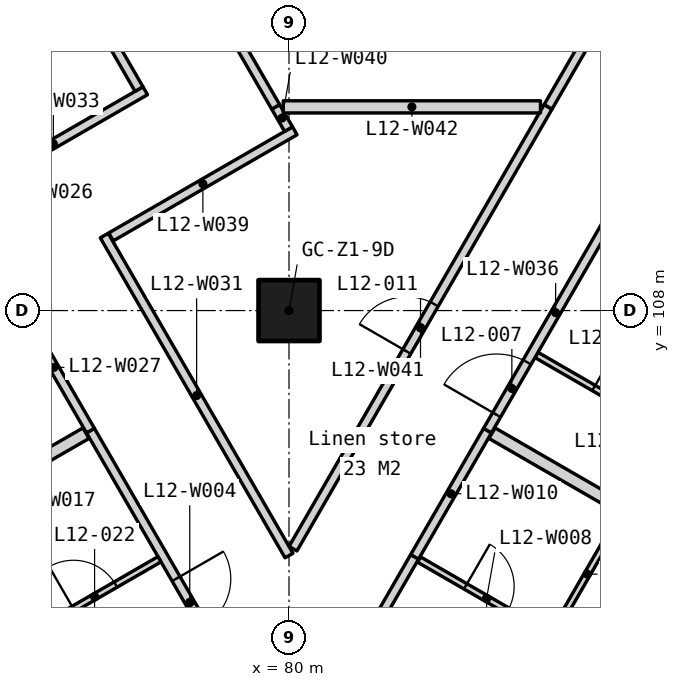
"""IFC4 building model, lengths in metres.
Left out: names, types, materials, properties, quantities, classifications, styles, units other than length and angle.
Written with IfcOpenShell. Run it as: python <this file> out.ifc"""

import sys

from ifc_helpers import new_model, si_unit, direction, frame, frame_2d, origin, origin_2d, place, context, subcontext, project, spatial, polyline, rectangle, outline, extrude, element, fill, save


model = new_model("IFC4")
c1 = context("Model", 3, precision=1e-05, world=origin(), true_north=direction((0.0, 1.0)))
c2 = subcontext(c1, "Body", "Model", "MODEL_VIEW")
j1 = project(units=[si_unit("LENGTHUNIT", "METRE"), si_unit("PLANEANGLEUNIT", "RADIAN")], contexts=[c1])
p1 = place(None, origin())
s1 = spatial("IfcSite", under=j1, at=p1, CompositionType="ELEMENT")
p2 = place(p1, origin())
s2 = spatial("IfcBuilding", under=s1, at=p2, CompositionType="ELEMENT")
p3 = place(p2, frame((0.0, 0.0, 56.0)))
s3 = spatial("IfcBuildingStorey", under=s2, at=p3, CompositionType="ELEMENT", Elevation=56.0)
p4 = place(p3, frame((80.0, 108.0, 0.0), z_axis=(0.0, 0.0, 1.0), x_axis=(1.0, 0.0, 0.0)))
e1 = element("IfcColumn", 1, at=p4, inside=s3, PredefinedType="COLUMN", context=c2, shape_type="SweptSolid", body=[
    extrude(rectangle(XDim=1.0, YDim=1.0, at=origin_2d()), origin(), (0.0, 0.0, 1.0), 3.5),
])
p5 = place(p3, frame((64.305, 112.405, -0.15), z_axis=(0.0, 0.0, 1.0), x_axis=(0.499997464327, -0.866026867751, 0.0)))
e2 = element("IfcWall", 2, at=p5, inside=s3, PredefinedType="SOLIDWALL", context=c2, shape_type="SweptSolid", body=[
    extrude(outline(polyline([(25.18, 3.5), (25.18, 0.0), (0.0, 0.0), (0.0, 3.5), (25.18, 3.5)])), frame((0.0, 0.225, 0.0), z_axis=(0.0, -1.0, 0.0), x_axis=(1.0, 0.0, 0.0)), (0.0, 0.0, 1.0), 0.45),
])
p6 = place(p5, frame((5.21, 0.0, 1.05)))
e3 = element("IfcOpeningElement", 3, at=p6, cuts=e2, PredefinedType="OPENING", context=c2, shape_type="SweptSolid", body=[
    extrude(rectangle(XDim=1.8, YDim=1.5, at=frame_2d((0.9, 0.75))), frame((0.0, 0.235, 0.0), z_axis=(0.0, -1.0, 0.0), x_axis=(1.0, 0.0, 0.0)), (0.0, 0.0, 1.0), 0.47),
])
p7 = place(p5, frame((7.51, 0.0, 1.05)))
e4 = element("IfcOpeningElement", 4, at=p7, cuts=e2, PredefinedType="OPENING", context=c2, shape_type="SweptSolid", body=[
    extrude(rectangle(XDim=1.8, YDim=1.5, at=frame_2d((0.9, 0.75))), frame((0.0, 0.235, 0.0), z_axis=(0.0, -1.0, 0.0), x_axis=(1.0, 0.0, 0.0)), (0.0, 0.0, 1.0), 0.47),
])
p8 = place(p5, frame((14.17, 0.0, 1.05)))
e5 = element("IfcOpeningElement", 5, at=p8, cuts=e2, PredefinedType="OPENING", context=c2, shape_type="SweptSolid", body=[
    extrude(rectangle(XDim=1.8, YDim=1.5, at=frame_2d((0.9, 0.75))), frame((0.0, 0.235, 0.0), z_axis=(0.0, -1.0, 0.0), x_axis=(1.0, 0.0, 0.0)), (0.0, 0.0, 1.0), 0.47),
])
p9 = place(p5, frame((16.47, 0.0, 1.05)))
e6 = element("IfcOpeningElement", 6, at=p9, cuts=e2, PredefinedType="OPENING", context=c2, shape_type="SweptSolid", body=[
    extrude(rectangle(XDim=1.8, YDim=1.5, at=frame_2d((0.9, 0.75))), frame((0.0, 0.235, 0.0), z_axis=(0.0, -1.0, 0.0), x_axis=(1.0, 0.0, 0.0)), (0.0, 0.0, 1.0), 0.47),
])
p10 = place(p5, frame((23.194, 0.0, 1.05)))
e7 = element("IfcOpeningElement", 7, at=p10, cuts=e2, PredefinedType="OPENING", context=c2, shape_type="SweptSolid", body=[
    extrude(rectangle(XDim=1.2, YDim=1.5, at=frame_2d((0.6, 0.75))), frame((0.0, 0.235, 0.0), z_axis=(0.0, -1.0, 0.0), x_axis=(1.0, 0.0, 0.0)), (0.0, 0.0, 1.0), 0.47),
])
p11 = place(p3, frame((83.105, 90.599, -0.15), z_axis=(0.0, 0.0, 1.0), x_axis=(0.499999201451, 0.866025864826, 0.0)))
e8 = element("IfcWall", 8, at=p11, inside=s3, PredefinedType="SOLIDWALL", context=c2, shape_type="SweptSolid", body=[
    extrude(outline(polyline([(44.8, 0.0), (44.8, 3.5), (0.0, 3.5), (0.0, 0.0), (44.8, 0.0)])), frame((0.0, 0.225, 0.0), z_axis=(0.0, -1.0, 0.0), x_axis=(1.0, 0.0, 0.0)), (0.0, 0.0, 1.0), 0.45),
])
p12 = place(p11, frame((0.786, 0.0, 1.05)))
e9 = element("IfcOpeningElement", 9, at=p12, cuts=e8, PredefinedType="OPENING", context=c2, shape_type="SweptSolid", body=[
    extrude(rectangle(XDim=1.2, YDim=1.5, at=frame_2d((0.6, 0.75))), frame((0.0, 0.235, 0.0), z_axis=(0.0, -1.0, 0.0), x_axis=(1.0, 0.0, 0.0)), (0.0, 0.0, 1.0), 0.47),
])
p13 = place(p11, frame((6.91, 0.0, 1.05)))
e10 = element("IfcOpeningElement", 10, at=p13, cuts=e8, PredefinedType="OPENING", context=c2, shape_type="SweptSolid", body=[
    extrude(rectangle(XDim=1.8, YDim=1.5, at=frame_2d((0.9, 0.75))), frame((0.0, 0.235, 0.0), z_axis=(0.0, -1.0, 0.0), x_axis=(1.0, 0.0, 0.0)), (0.0, 0.0, 1.0), 0.47),
])
p14 = place(p11, frame((9.21, 0.0, 1.05)))
e11 = element("IfcOpeningElement", 11, at=p14, cuts=e8, PredefinedType="OPENING", context=c2, shape_type="SweptSolid", body=[
    extrude(rectangle(XDim=1.8, YDim=1.5, at=frame_2d((0.9, 0.75))), frame((0.0, 0.235, 0.0), z_axis=(0.0, -1.0, 0.0), x_axis=(1.0, 0.0, 0.0)), (0.0, 0.0, 1.0), 0.47),
])
p15 = place(p11, frame((15.87, 0.0, 1.05)))
e12 = element("IfcOpeningElement", 12, at=p15, cuts=e8, PredefinedType="OPENING", context=c2, shape_type="SweptSolid", body=[
    extrude(rectangle(XDim=1.8, YDim=1.5, at=frame_2d((0.9, 0.75))), frame((0.0, 0.235, 0.0), z_axis=(0.0, -1.0, 0.0), x_axis=(1.0, 0.0, 0.0)), (0.0, 0.0, 1.0), 0.47),
])
p16 = place(p11, frame((18.17, 0.0, 1.05)))
e13 = element("IfcOpeningElement", 13, at=p16, cuts=e8, PredefinedType="OPENING", context=c2, shape_type="SweptSolid", body=[
    extrude(rectangle(XDim=1.8, YDim=1.5, at=frame_2d((0.9, 0.75))), frame((0.0, 0.235, 0.0), z_axis=(0.0, -1.0, 0.0), x_axis=(1.0, 0.0, 0.0)), (0.0, 0.0, 1.0), 0.47),
])
p17 = place(p11, frame((24.83, 0.0, 1.05)))
e14 = element("IfcOpeningElement", 14, at=p17, cuts=e8, PredefinedType="OPENING", context=c2, shape_type="SweptSolid", body=[
    extrude(rectangle(XDim=1.8, YDim=1.5, at=frame_2d((0.9, 0.75))), frame((0.0, 0.235, 0.0), z_axis=(0.0, -1.0, 0.0), x_axis=(1.0, 0.0, 0.0)), (0.0, 0.0, 1.0), 0.47),
])
p18 = place(p11, frame((27.13, 0.0, 1.05)))
e15 = element("IfcOpeningElement", 15, at=p18, cuts=e8, PredefinedType="OPENING", context=c2, shape_type="SweptSolid", body=[
    extrude(rectangle(XDim=1.8, YDim=1.5, at=frame_2d((0.9, 0.75))), frame((0.0, 0.235, 0.0), z_axis=(0.0, -1.0, 0.0), x_axis=(1.0, 0.0, 0.0)), (0.0, 0.0, 1.0), 0.47),
])
p19 = place(p11, frame((33.79, 0.0, 1.05)))
e16 = element("IfcOpeningElement", 16, at=p19, cuts=e8, PredefinedType="OPENING", context=c2, shape_type="SweptSolid", body=[
    extrude(rectangle(XDim=1.8, YDim=1.5, at=frame_2d((0.9, 0.75))), frame((0.0, 0.235, 0.0), z_axis=(0.0, -1.0, 0.0), x_axis=(1.0, 0.0, 0.0)), (0.0, 0.0, 1.0), 0.47),
])
p20 = place(p11, frame((36.09, 0.0, 1.05)))
e17 = element("IfcOpeningElement", 17, at=p20, cuts=e8, PredefinedType="OPENING", context=c2, shape_type="SweptSolid", body=[
    extrude(rectangle(XDim=1.8, YDim=1.5, at=frame_2d((0.9, 0.75))), frame((0.0, 0.235, 0.0), z_axis=(0.0, -1.0, 0.0), x_axis=(1.0, 0.0, 0.0)), (0.0, 0.0, 1.0), 0.47),
])
p21 = place(p11, frame((42.814, 0.0, 1.05)))
e18 = element("IfcOpeningElement", 18, at=p21, cuts=e8, PredefinedType="OPENING", context=c2, shape_type="SweptSolid", body=[
    extrude(rectangle(XDim=1.2, YDim=1.5, at=frame_2d((0.6, 0.75))), frame((0.0, 0.235, 0.0), z_axis=(0.0, -1.0, 0.0), x_axis=(1.0, 0.0, 0.0)), (0.0, 0.0, 1.0), 0.47),
])
p22 = place(p3, frame((76.735, 106.026, 0.0), z_axis=(0.0, 0.0, 1.0), x_axis=(0.499995393218, -0.866028063495, 0.0)))
e19 = element("IfcWall", 19, at=p22, inside=s3, PredefinedType="PARTITIONING", context=c2, shape_type="SweptSolid", body=[
    extrude(rectangle(XDim=6.53, YDim=0.15, at=frame_2d((3.265, 0.0))), origin(), (0.0, 0.0, 1.0), 3.35),
])
p23 = place(p22, frame((2.815, 0.0, 0.0)))
e20 = element("IfcOpeningElement", 20, at=p23, cuts=e19, PredefinedType="OPENING", context=c2, shape_type="SweptSolid", body=[
    extrude(rectangle(XDim=0.9, YDim=2.1, at=frame_2d((0.45, 1.05))), frame((0.0, 0.085, 0.0), z_axis=(0.0, -1.0, 0.0), x_axis=(1.0, 0.0, 0.0)), (0.0, 0.0, 1.0), 0.17),
])
p24 = place(p3, frame((83.339, 105.983, 0.0), z_axis=(0.0, 0.0, 1.0), x_axis=(0.866023858256, -0.500002676924, 0.0)))
e21 = element("IfcWall", 21, at=p24, inside=s3, PredefinedType="PARTITIONING", context=c2, shape_type="SweptSolid", body=[
    extrude(rectangle(XDim=7.265, YDim=0.2, at=frame_2d((3.633, 0.0))), origin(), (0.0, 0.0, 1.0), 3.35),
])
p25 = place(p3, frame((82.139, 103.905, 0.0), z_axis=(0.0, 0.0, 1.0), x_axis=(0.866014388206, -0.500019079056, 0.0)))
e22 = element("IfcWall", 22, at=p25, inside=s3, PredefinedType="PARTITIONING", context=c2, shape_type="SweptSolid", body=[
    extrude(rectangle(XDim=2.565, YDim=0.1, at=frame_2d((1.282, 0.0))), origin(), (0.0, 0.0, 1.0), 3.35),
])
p26 = place(p25, frame((0.883, 0.0, 0.0)))
e23 = element("IfcOpeningElement", 23, at=p26, cuts=e22, PredefinedType="OPENING", context=c2, shape_type="SweptSolid", body=[
    extrude(rectangle(XDim=0.8, YDim=2.1, at=frame_2d((0.4, 1.05))), frame((0.0, 0.06, 0.0), z_axis=(0.0, -1.0, 0.0), x_axis=(1.0, 0.0, 0.0)), (0.0, 0.0, 1.0), 0.12),
])
p27 = place(p3, frame((75.735, 102.677, 0.0), z_axis=(0.0, 0.0, 1.0), x_axis=(0.866040446274, 0.499973944738, 0.0)))
e24 = element("IfcWall", 24, at=p27, inside=s3, PredefinedType="PARTITIONING", context=c2, shape_type="SweptSolid", body=[
    extrude(rectangle(XDim=2.465, YDim=0.1, at=frame_2d((1.232, 0.0))), origin(), (0.0, 0.0, 1.0), 3.35),
])
p28 = place(p27, frame((0.833, 0.0, 0.0)))
e25 = element("IfcOpeningElement", 25, at=p28, cuts=e24, PredefinedType="OPENING", context=c2, shape_type="SweptSolid", body=[
    extrude(rectangle(XDim=0.8, YDim=2.1, at=frame_2d((0.4, 1.05))), frame((0.0, 0.06, 0.0), z_axis=(0.0, -1.0, 0.0), x_axis=(1.0, 0.0, 0.0)), (0.0, 0.0, 1.0), 0.12),
])
p29 = place(p3, frame((82.065, 103.947, 0.0), z_axis=(0.0, 0.0, 1.0), x_axis=(0.500001309137, 0.866024647952, 0.0)))
e26 = element("IfcWall", 26, at=p29, inside=s3, PredefinedType="PARTITIONING", context=c2, shape_type="SweptSolid", body=[
    extrude(rectangle(XDim=2.4, YDim=0.15, at=frame_2d((1.2, 0.0))), origin(), (0.0, 0.0, 1.0), 3.35),
])
p30 = place(p3, frame((80.06, 100.474, 0.0), z_axis=(0.0, 0.0, 1.0), x_axis=(0.499963124258, 0.866046692957, 0.0)))
e27 = element("IfcWall", 27, at=p30, inside=s3, PredefinedType="PARTITIONING", context=c2, shape_type="SweptSolid", body=[
    extrude(rectangle(XDim=4.01, YDim=0.15, at=frame_2d((2.005, 0.0))), origin(), (0.0, 0.0, 1.0), 3.35),
])
p31 = place(p30, frame((1.555, 0.0, 0.0)))
e28 = element("IfcOpeningElement", 28, at=p31, cuts=e27, PredefinedType="OPENING", context=c2, shape_type="SweptSolid", body=[
    extrude(rectangle(XDim=0.9, YDim=2.1, at=frame_2d((0.45, 1.05))), frame((0.0, 0.085, 0.0), z_axis=(0.0, -1.0, 0.0), x_axis=(1.0, 0.0, 0.0)), (0.0, 0.0, 1.0), 0.17),
])
p32 = place(p3, frame((84.342, 102.69, 0.0), z_axis=(0.0, 0.0, 1.0), x_axis=(0.499966648284, 0.866044658551, 0.0)))
e29 = element("IfcWall", 29, at=p32, inside=s3, PredefinedType="PARTITIONING", context=c2, shape_type="SweptSolid", body=[
    extrude(rectangle(XDim=2.25, YDim=0.1, at=frame_2d((1.125, 0.0))), origin(), (0.0, 0.0, 1.0), 3.35),
])
p33 = place(p3, frame((84.07, 107.27, 0.0), z_axis=(0.0, 0.0, 1.0), x_axis=(0.866053027861, -0.499952150643, 0.0)))
e30 = element("IfcWall", 30, at=p33, inside=s3, PredefinedType="PARTITIONING", context=c2, shape_type="SweptSolid", body=[
    extrude(rectangle(XDim=2.975, YDim=0.1, at=frame_2d((1.487, 0.0))), origin(), (0.0, 0.0, 1.0), 3.35),
])
p34 = place(p33, frame((1.087, 0.0, 0.0)))
e31 = element("IfcOpeningElement", 31, at=p34, cuts=e30, PredefinedType="OPENING", context=c2, shape_type="SweptSolid", body=[
    extrude(rectangle(XDim=0.8, YDim=2.1, at=frame_2d((0.4, 1.05))), frame((0.0, 0.06, 0.0), z_axis=(0.0, -1.0, 0.0), x_axis=(1.0, 0.0, 0.0)), (0.0, 0.0, 1.0), 0.12),
])
p35 = place(p3, frame((74.483, 104.726, 0.0), z_axis=(0.0, 0.0, 1.0), x_axis=(0.866006140796, 0.500033362991, 0.0)))
e32 = element("IfcWall", 32, at=p35, inside=s3, PredefinedType="PARTITIONING", context=c2, shape_type="SweptSolid", body=[
    extrude(rectangle(XDim=2.515, YDim=0.2, at=frame_2d((1.257, 0.0))), origin(), (0.0, 0.0, 1.0), 3.35),
])
p36 = place(p3, frame((75.535, 108.104, 0.0), z_axis=(0.0, 0.0, 1.0), x_axis=(0.500033551112, -0.866006032174, 0.0)))
e33 = element("IfcWall", 33, at=p36, inside=s3, PredefinedType="PARTITIONING", context=c2, shape_type="SweptSolid", body=[
    extrude(rectangle(XDim=2.4, YDim=0.15, at=frame_2d((1.2, 0.0))), origin(), (0.0, 0.0, 1.0), 3.35),
])
p37 = place(p3, frame((76.961, 109.234, 0.0), z_axis=(0.0, 0.0, 1.0), x_axis=(0.499984420002, -0.866034398714, 0.0)))
e34 = element("IfcWall", 34, at=p37, inside=s3, PredefinedType="PARTITIONING", context=c2, shape_type="SweptSolid", body=[
    extrude(rectangle(XDim=6.077, YDim=0.15, at=frame_2d((3.039, 0.0))), origin(), (0.0, 0.0, 1.0), 3.35),
])
p38 = place(p3, frame((74.614, 109.87, 0.0), z_axis=(0.0, 0.0, 1.0), x_axis=(0.866043466982, 0.49996871232, 0.0)))
e35 = element("IfcWall", 35, at=p38, inside=s3, PredefinedType="PARTITIONING", context=c2, shape_type="SweptSolid", body=[
    extrude(rectangle(XDim=3.49, YDim=0.15, at=frame_2d((1.745, 0.0))), origin(), (0.0, 0.0, 1.0), 3.35),
])
p39 = place(p3, frame((83.265, 106.026, 0.0), z_axis=(0.0, 0.0, 1.0), x_axis=(0.499989762656, 0.866031314237, 0.0)))
e36 = element("IfcWall", 36, at=p39, inside=s3, PredefinedType="PARTITIONING", context=c2, shape_type="SweptSolid", body=[
    extrude(rectangle(XDim=4.48, YDim=0.15, at=frame_2d((2.24, 0.0))), origin(), (0.0, 0.0, 1.0), 3.35),
])
p40 = place(p39, frame((0.3, 0.0, 0.0)))
e37 = element("IfcOpeningElement", 37, at=p40, cuts=e36, PredefinedType="OPENING", context=c2, shape_type="SweptSolid", body=[
    extrude(rectangle(XDim=1.0, YDim=2.1, at=frame_2d((0.5, 1.05))), frame((0.0, 0.085, 0.0), z_axis=(0.0, -1.0, 0.0), x_axis=(1.0, 0.0, 0.0)), (0.0, 0.0, 1.0), 0.17),
])
p41 = place(p3, frame((77.073, 109.211, 0.0), z_axis=(0.0, 0.0, 1.0), x_axis=(0.866013176292, 0.50002117804, 0.0)))
e38 = element("IfcWall", 38, at=p41, inside=s3, PredefinedType="PARTITIONING", context=c2, shape_type="SweptSolid", body=[
    extrude(rectangle(XDim=3.49, YDim=0.15, at=frame_2d((1.745, 0.0))), origin(), (0.0, 0.0, 1.0), 3.35),
])
p42 = place(p3, frame((79.781, 111.35, 0.0), z_axis=(0.0, 0.0, 1.0), x_axis=(0.499739105689, -0.866175978797, 0.0)))
e39 = element("IfcWall", 39, at=p42, inside=s3, PredefinedType="PARTITIONING", context=c2, shape_type="SweptSolid", body=[
    extrude(rectangle(XDim=0.423, YDim=0.15, at=frame_2d((0.211, 0.0))), origin(), (0.0, 0.0, 1.0), 3.35),
])
p43 = place(p3, frame((80.065, 104.083, 0.0), z_axis=(0.0, 0.0, 1.0), x_axis=(0.49999109456, 0.866030545282, 0.0)))
e40 = element("IfcWall", 40, at=p43, inside=s3, PredefinedType="PARTITIONING", context=c2, shape_type="SweptSolid", body=[
    extrude(rectangle(XDim=8.391, YDim=0.15, at=frame_2d((4.196, 0.0))), origin(), (0.0, 0.0, 1.0), 3.35),
])
p44 = place(p43, frame((3.746, 0.0, 0.0)))
e41 = element("IfcOpeningElement", 41, at=p44, cuts=e40, PredefinedType="OPENING", context=c2, shape_type="SweptSolid", body=[
    extrude(rectangle(XDim=0.9, YDim=2.1, at=frame_2d((0.45, 1.05))), frame((0.0, 0.085, 0.0), z_axis=(0.0, -1.0, 0.0), x_axis=(1.0, 0.0, 0.0)), (0.0, 0.0, 1.0), 0.17),
])
p45 = place(p3, frame((79.906, 111.35, 0.0), z_axis=(0.0, 0.0, 1.0), x_axis=(1.0, 0.0, 0.0)))
e42 = element("IfcWall", 42, at=p45, inside=s3, PredefinedType="PARTITIONING", context=c2, shape_type="SweptSolid", body=[
    extrude(rectangle(XDim=4.229, YDim=0.2, at=frame_2d((2.115, 0.0))), origin(), (0.0, 0.0, 1.0), 3.35),
])
p46 = place(p3, frame((84.26, 111.35, 0.0), z_axis=(0.0, 0.0, 1.0), x_axis=(0.500003186274, 0.866023564181, 0.0)))
e43 = element("IfcWall", 43, at=p46, inside=s3, PredefinedType="PARTITIONING", context=c2, shape_type="SweptSolid", body=[
    extrude(rectangle(XDim=4.492, YDim=0.15, at=frame_2d((2.246, 0.0))), origin(), (0.0, 0.0, 1.0), 3.35),
])
p47 = place(p46, frame((1.796, 0.0, 0.0)))
e44 = element("IfcOpeningElement", 44, at=p47, cuts=e43, PredefinedType="OPENING", context=c2, shape_type="SweptSolid", body=[
    extrude(rectangle(XDim=0.9, YDim=2.1, at=frame_2d((0.45, 1.05))), frame((0.0, 0.085, 0.0), z_axis=(0.0, -1.0, 0.0), x_axis=(1.0, 0.0, 0.0)), (0.0, 0.0, 1.0), 0.17),
])
p48 = place(p3, frame((74.007, 117.75, 0.0), z_axis=(0.0, 0.0, 1.0), x_axis=(0.500026110575, -0.866010328312, 0.0)))
e45 = element("IfcWall", 45, at=p48, inside=s3, PredefinedType="PARTITIONING", context=c2, shape_type="SweptSolid", body=[
    extrude(rectangle(XDim=7.052, YDim=0.15, at=frame_2d((3.526, 0.0))), origin(), (0.0, 0.0, 1.0), 3.35),
])
p49 = place(p48, frame((3.026, 0.0, 0.0)))
e46 = element("IfcOpeningElement", 46, at=p49, cuts=e45, PredefinedType="OPENING", context=c2, shape_type="SweptSolid", body=[
    extrude(rectangle(XDim=1.0, YDim=2.1, at=frame_2d((0.5, 1.05))), frame((0.0, 0.085, 0.0), z_axis=(0.0, -1.0, 0.0), x_axis=(1.0, 0.0, 0.0)), (0.0, 0.0, 1.0), 0.17),
])
p50 = place(p3, frame((77.535, 115.24, 0.0), z_axis=(0.0, 0.0, 1.0), x_axis=(0.500043949999, -0.866000027754, 0.0)))
e47 = element("IfcWall", 47, at=p50, inside=s3, PredefinedType="PARTITIONING", context=c2, shape_type="SweptSolid", body=[
    extrude(rectangle(XDim=4.492, YDim=0.15, at=frame_2d((2.246, 0.0))), origin(), (0.0, 0.0, 1.0), 3.35),
])
p51 = place(p23, origin())
e48 = element("IfcDoor", 48, at=p51, inside=s3, OperationType="SINGLE_SWING_LEFT", PredefinedType="DOOR", context=c2, shape_type="SweptSolid", body=[
    extrude(rectangle(XDim=0.9, YDim=2.1, at=frame_2d((0.45, 1.05))), frame((0.0, 0.025, 0.0), z_axis=(0.0, -1.0, 0.0), x_axis=(1.0, 0.0, 0.0)), (0.0, 0.0, 1.0), 0.05),
])
fill(e20, e48)
p52 = place(p40, origin())
e49 = element("IfcDoor", 49, at=p52, inside=s3, OperationType="SINGLE_SWING_LEFT", PredefinedType="DOOR", context=c2, shape_type="SweptSolid", body=[
    extrude(rectangle(XDim=1.0, YDim=2.1, at=frame_2d((0.5, 1.05))), frame((0.0, 0.025, 0.0), z_axis=(0.0, -1.0, 0.0), x_axis=(1.0, 0.0, 0.0)), (0.0, 0.0, 1.0), 0.05),
])
fill(e37, e49)
p53 = place(p44, origin())
e50 = element("IfcDoor", 50, at=p53, inside=s3, OperationType="SINGLE_SWING_LEFT", PredefinedType="DOOR", context=c2, shape_type="SweptSolid", body=[
    extrude(rectangle(XDim=0.9, YDim=2.1, at=frame_2d((0.45, 1.05))), frame((0.0, 0.025, 0.0), z_axis=(0.0, -1.0, 0.0), x_axis=(1.0, 0.0, 0.0)), (0.0, 0.0, 1.0), 0.05),
])
fill(e41, e50)
p54 = place(p28, origin())
e51 = element("IfcDoor", 51, at=p54, inside=s3, OperationType="SINGLE_SWING_LEFT", PredefinedType="DOOR", context=c2, shape_type="SweptSolid", body=[
    extrude(rectangle(XDim=0.8, YDim=2.1, at=frame_2d((0.4, 1.05))), frame((0.0, 0.025, 0.0), z_axis=(0.0, -1.0, 0.0), x_axis=(1.0, 0.0, 0.0)), (0.0, 0.0, 1.0), 0.05),
])
fill(e25, e51)
p55 = place(p26, origin())
e52 = element("IfcDoor", 52, at=p55, inside=s3, OperationType="SINGLE_SWING_LEFT", PredefinedType="DOOR", context=c2, shape_type="SweptSolid", body=[
    extrude(rectangle(XDim=0.8, YDim=2.1, at=frame_2d((0.4, 1.05))), frame((0.0, 0.025, 0.0), z_axis=(0.0, -1.0, 0.0), x_axis=(1.0, 0.0, 0.0)), (0.0, 0.0, 1.0), 0.05),
])
fill(e23, e52)
p56 = place(p34, origin())
e53 = element("IfcDoor", 53, at=p56, inside=s3, OperationType="SINGLE_SWING_LEFT", PredefinedType="DOOR", context=c2, shape_type="SweptSolid", body=[
    extrude(rectangle(XDim=0.8, YDim=2.1, at=frame_2d((0.4, 1.05))), frame((0.0, 0.025, 0.0), z_axis=(0.0, -1.0, 0.0), x_axis=(1.0, 0.0, 0.0)), (0.0, 0.0, 1.0), 0.05),
])
fill(e31, e53)
save(model, sys.argv[1])
